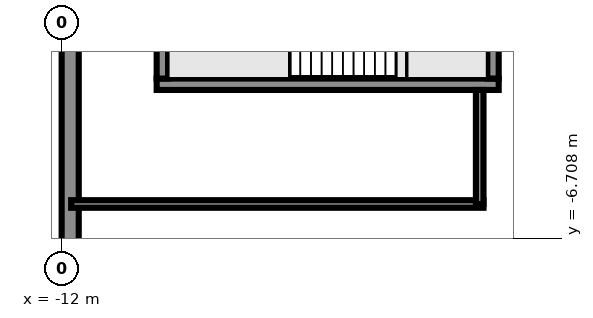
"""IFC4 building model, lengths in metres.
Left out: names, types, materials, properties, quantities, classifications, styles, units other than length and angle.
Written with IfcOpenShell. Run it as: python <this file> out.ifc"""

import sys

from ifc_helpers import new_model, si_unit, direction, frame, frame_2d, origin, origin_2d, place, context, subcontext, project, spatial, rectangle, extrude, element, fill, save


model = new_model("IFC4")
c1 = context("Model", 3, precision=1e-05, world=origin(), true_north=direction((0.0, 1.0)))
c2 = subcontext(c1, "Body", "Model", "MODEL_VIEW")
j1 = project(units=[si_unit("LENGTHUNIT", "METRE"), si_unit("PLANEANGLEUNIT", "RADIAN")], contexts=[c1])
p1 = place(None, origin())
s1 = spatial("IfcSite", under=j1, at=p1, CompositionType="ELEMENT")
p2 = place(p1, origin())
s2 = spatial("IfcBuilding", under=s1, at=p2, CompositionType="ELEMENT")
p3 = place(p2, origin())
s3 = spatial("IfcBuildingStorey", under=s2, at=p3, CompositionType="ELEMENT", Elevation=0.0)
p4 = place(p3, frame((-6.0, -4.0, 0.0), z_axis=(0.0, 0.0, 1.0), x_axis=(1.0, 0.0, 0.0)))
e1 = element("IfcColumn", 1, at=p4, inside=s3, PredefinedType="COLUMN", context=c2, shape_type="SweptSolid", body=[
    extrude(rectangle(XDim=1.0, YDim=1.0, at=origin_2d()), origin(), (0.0, 0.0, 1.0), 8.0),
])
p5 = place(p3, frame((-11.775, 1.45, 0.0), z_axis=(0.0, 0.0, 1.0), x_axis=(0.0, -1.0, 0.0)))
e2 = element("IfcWall", 2, at=p5, inside=s3, PredefinedType="SOLIDWALL", context=c2, shape_type="SweptSolid", body=[
    extrude(rectangle(XDim=9.9, YDim=0.45, at=frame_2d((4.95, 0.0))), origin(), (0.0, 0.0, 1.0), 7.7),
])
p6 = place(p5, frame((4.8, 0.0, 0.0)))
e3 = element("IfcOpeningElement", 3, at=p6, cuts=e2, PredefinedType="OPENING", context=c2, shape_type="SweptSolid", body=[
    extrude(rectangle(XDim=1.8, YDim=2.4, at=frame_2d((0.9, 1.2))), frame((0.0, 0.235, 0.0), z_axis=(0.0, -1.0, 0.0), x_axis=(1.0, 0.0, 0.0)), (0.0, 0.0, 1.0), 0.47),
])
p7 = place(p5, frame((0.45, 0.0, 0.0)))
e4 = element("IfcOpeningElement", 4, at=p7, cuts=e2, PredefinedType="OPENING", context=c2, shape_type="SweptSolid", body=[
    extrude(rectangle(XDim=2.4, YDim=2.4, at=frame_2d((1.2, 1.2))), frame((0.0, 0.235, 0.0), z_axis=(0.0, -1.0, 0.0), x_axis=(1.0, 0.0, 0.0)), (0.0, 0.0, 1.0), 0.47),
])
p8 = place(p3, frame((-9.5, -2.65, 0.0), z_axis=(0.0, 0.0, 1.0), x_axis=(1.0, 0.0, 0.0)))
e5 = element("IfcWall", 5, at=p8, inside=s3, PredefinedType="SHEAR", context=c2, shape_type="SweptSolid", body=[
    extrude(rectangle(XDim=9.0, YDim=0.3, at=frame_2d((4.5, 0.0))), origin(), (0.0, 0.0, 1.0), 7.7),
])
p9 = place(p8, frame((5.9, 0.0, 0.0)))
e6 = element("IfcOpeningElement", 6, at=p9, cuts=e5, PredefinedType="OPENING", context=c2, shape_type="SweptSolid", body=[
    extrude(rectangle(XDim=1.8, YDim=2.1, at=frame_2d((0.9, 1.05))), frame((0.0, 0.16, 0.0), z_axis=(0.0, -1.0, 0.0), x_axis=(1.0, 0.0, 0.0)), (0.0, 0.0, 1.0), 0.32),
])
p10 = place(p3, frame((-9.35, -2.5, 0.0), z_axis=(0.0, 0.0, 1.0), x_axis=(0.0, 1.0, 0.0)))
e7 = element("IfcWall", 7, at=p10, inside=s3, PredefinedType="SHEAR", context=c2, shape_type="SweptSolid", body=[
    extrude(rectangle(XDim=4.95, YDim=0.3, at=frame_2d((2.475, 0.0))), origin(), (0.0, 0.0, 1.0), 7.7),
])
p11 = place(p3, frame((-0.65, -2.5, 0.0), z_axis=(0.0, 0.0, 1.0), x_axis=(0.0, 1.0, 0.0)))
e8 = element("IfcWall", 8, at=p11, inside=s3, PredefinedType="SHEAR", context=c2, shape_type="SweptSolid", body=[
    extrude(rectangle(XDim=4.95, YDim=0.3, at=frame_2d((2.475, 0.0))), origin(), (0.0, 0.0, 1.0), 7.7),
])
p12 = place(p11, frame((1.275, 0.0, 0.0)))
e9 = element("IfcOpeningElement", 9, at=p12, cuts=e8, PredefinedType="OPENING", context=c2, shape_type="SweptSolid", body=[
    extrude(rectangle(XDim=2.4, YDim=2.1, at=frame_2d((1.2, 1.05))), frame((0.0, 0.16, 0.0), z_axis=(0.0, -1.0, 0.0), x_axis=(1.0, 0.0, 0.0)), (0.0, 0.0, 1.0), 0.32),
])
p13 = place(p3, frame((-11.75, -5.8, 0.0), z_axis=(0.0, 0.0, 1.0), x_axis=(1.0, 0.0, 0.0)))
e10 = element("IfcWall", 10, at=p13, inside=s3, PredefinedType="PARTITIONING", context=c2, shape_type="SweptSolid", body=[
    extrude(rectangle(XDim=10.85, YDim=0.2, at=frame_2d((5.425, 0.0))), origin(), (0.0, 0.0, 1.0), 7.7),
])
p14 = place(p3, frame((-1.0, -5.8, 0.0), z_axis=(0.0, 0.0, 1.0), x_axis=(0.0, 1.0, 0.0)))
e11 = element("IfcWall", 11, at=p14, inside=s3, PredefinedType="PARTITIONING", context=c2, shape_type="SweptSolid", body=[
    extrude(rectangle(XDim=3.0, YDim=0.2, at=frame_2d((1.5, 0.0))), origin(), (0.0, 0.0, 1.0), 7.7),
])
p15 = place(p6, origin())
e12 = element("IfcDoor", 12, at=p15, inside=s3, OperationType="DOUBLE_DOOR_DOUBLE_SWING", PredefinedType="DOOR", context=c2, shape_type="SweptSolid", body=[
    extrude(rectangle(XDim=1.8, YDim=2.4, at=frame_2d((0.9, 1.2))), frame((0.0, 0.025, 0.0), z_axis=(0.0, -1.0, 0.0), x_axis=(1.0, 0.0, 0.0)), (0.0, 0.0, 1.0), 0.05),
])
fill(e3, e12)
p16 = place(p9, origin())
e13 = element("IfcDoor", 13, at=p16, inside=s3, OperationType="DOUBLE_DOOR_SINGLE_SWING", PredefinedType="DOOR", context=c2, shape_type="SweptSolid", body=[
    extrude(rectangle(XDim=1.8, YDim=2.1, at=frame_2d((0.9, 1.05))), frame((0.0, 0.025, 0.0), z_axis=(0.0, -1.0, 0.0), x_axis=(1.0, 0.0, 0.0)), (0.0, 0.0, 1.0), 0.05),
])
fill(e6, e13)
save(model, sys.argv[1])
